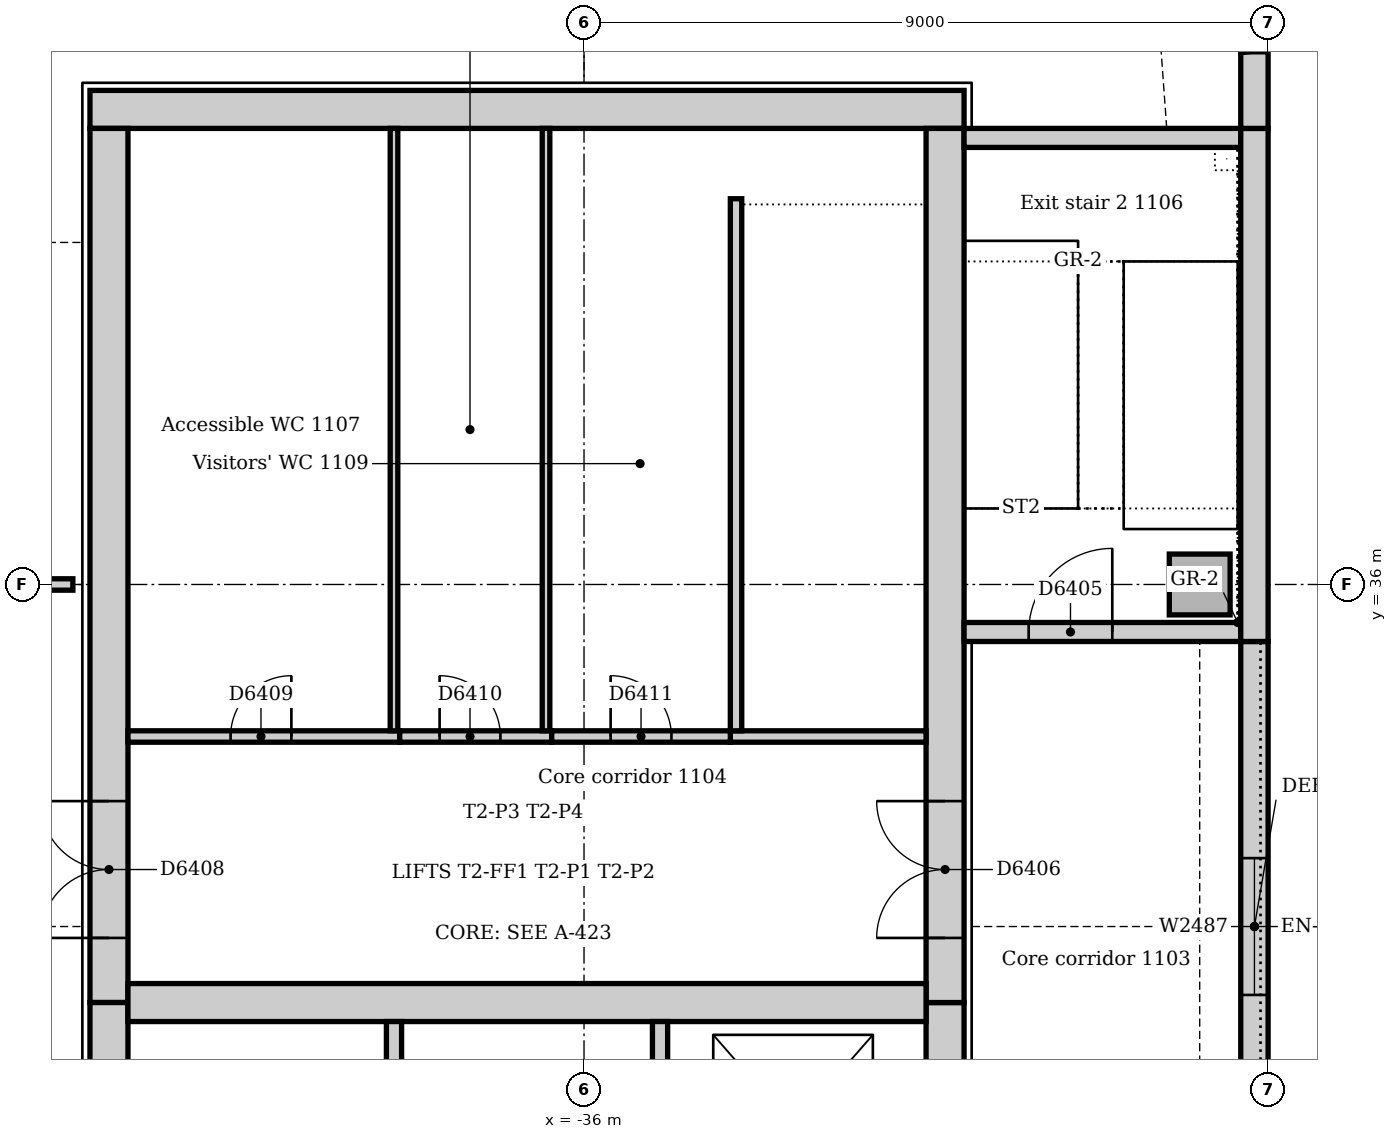
"""IFC4 building model, lengths in metres.
Left out: names, types, materials, properties, quantities, classifications, styles, units other than length and angle.
Written with IfcOpenShell. Run it as: python <this file> out.ifc"""

import sys

from ifc_helpers import new_model, si_unit, direction, frame, frame_2d, origin, origin_2d, place, context, subcontext, project, spatial, rectangle, extrude, element, fill, save


model = new_model("IFC4")
c1 = context("Model", 3, precision=1e-05, world=origin(), true_north=direction((0.0, 1.0)))
c2 = subcontext(c1, "Body", "Model", "MODEL_VIEW")
j1 = project(units=[si_unit("LENGTHUNIT", "METRE"), si_unit("PLANEANGLEUNIT", "RADIAN")], contexts=[c1])
p1 = place(None, origin())
s1 = spatial("IfcSite", under=j1, at=p1, CompositionType="ELEMENT")
p2 = place(p1, origin())
s2 = spatial("IfcBuilding", under=s1, at=p2, CompositionType="ELEMENT")
p3 = place(p2, frame((0.0, 0.0, 51.0)))
s3 = spatial("IfcBuildingStorey", under=s2, at=p3, CompositionType="ELEMENT", Elevation=51.0)
p4 = place(p3, frame((-31.0, 42.25, 0.0), z_axis=(0.0, 0.0, 1.0), x_axis=(-1.0, 0.0, 0.0)))
e1 = element("IfcWall", 1, at=p4, inside=s3, PredefinedType="SOLIDWALL", context=c2, shape_type="SweptSolid", body=[
    extrude(rectangle(XDim=11.5, YDim=0.5, at=frame_2d((5.75, 0.0))), origin(), (0.0, 0.0, 1.0), 4.0),
])
p5 = place(p3, frame((-31.25, 21.0, 0.0), z_axis=(0.0, 0.0, 1.0), x_axis=(0.0, 1.0, 0.0)))
e2 = element("IfcWall", 2, at=p5, inside=s3, PredefinedType="SOLIDWALL", context=c2, shape_type="SweptSolid", body=[
    extrude(rectangle(XDim=9.5, YDim=0.5, at=frame_2d((4.75, 0.0))), origin(), (0.0, 0.0, 1.0), 4.0),
])
p6 = place(p5, frame((5.25, 0.0, 0.0)))
e3 = element("IfcOpeningElement", 3, at=p6, cuts=e2, PredefinedType="OPENING", context=c2, shape_type="SweptSolid", body=[
    extrude(rectangle(XDim=1.0, YDim=2.1, at=frame_2d((0.5, 1.05))), frame((0.0, 0.26, 0.0), z_axis=(0.0, -1.0, 0.0), x_axis=(1.0, 0.0, 0.0)), (0.0, 0.0, 1.0), 0.52),
])
p7 = place(p3, frame((-31.25, 30.5, 0.0), z_axis=(0.0, 0.0, 1.0), x_axis=(0.0, 1.0, 0.0)))
e4 = element("IfcWall", 4, at=p7, inside=s3, PredefinedType="SOLIDWALL", context=c2, shape_type="SweptSolid", body=[
    extrude(rectangle(XDim=11.5, YDim=0.5, at=frame_2d((5.75, 0.0))), origin(), (0.0, 0.0, 1.0), 4.0),
])
p8 = place(p7, frame((0.85, 0.0, 0.0)))
e5 = element("IfcOpeningElement", 5, at=p8, cuts=e4, PredefinedType="OPENING", context=c2, shape_type="SweptSolid", body=[
    extrude(rectangle(XDim=1.8, YDim=2.1, at=frame_2d((0.9, 1.05))), frame((0.0, 0.26, 0.0), z_axis=(0.0, -1.0, 0.0), x_axis=(1.0, 0.0, 0.0)), (0.0, 0.0, 1.0), 0.52),
])
p9 = place(p3, frame((-42.25, 42.0, 0.0), z_axis=(0.0, 0.0, 1.0), x_axis=(0.0, -1.0, 0.0)))
e6 = element("IfcWall", 6, at=p9, inside=s3, PredefinedType="SOLIDWALL", context=c2, shape_type="SweptSolid", body=[
    extrude(rectangle(XDim=11.5, YDim=0.5, at=frame_2d((5.75, 0.0))), origin(), (0.0, 0.0, 1.0), 4.0),
])
p10 = place(p9, frame((8.85, 0.0, 0.0)))
e7 = element("IfcOpeningElement", 7, at=p10, cuts=e6, PredefinedType="OPENING", context=c2, shape_type="SweptSolid", body=[
    extrude(rectangle(XDim=1.8, YDim=2.1, at=frame_2d((0.9, 1.05))), frame((0.0, 0.26, 0.0), z_axis=(0.0, -1.0, 0.0), x_axis=(1.0, 0.0, 0.0)), (0.0, 0.0, 1.0), 0.52),
])
p11 = place(p3, frame((-42.25, 30.5, 0.0), z_axis=(0.0, 0.0, 1.0), x_axis=(0.0, -1.0, 0.0)))
e8 = element("IfcWall", 8, at=p11, inside=s3, PredefinedType="SOLIDWALL", context=c2, shape_type="SweptSolid", body=[
    extrude(rectangle(XDim=9.5, YDim=0.5, at=frame_2d((4.75, 0.0))), origin(), (0.0, 0.0, 1.0), 4.0),
])
p12 = place(p11, frame((3.85, 0.0, 0.0)))
e9 = element("IfcOpeningElement", 9, at=p12, cuts=e8, PredefinedType="OPENING", context=c2, shape_type="SweptSolid", body=[
    extrude(rectangle(XDim=1.8, YDim=2.1, at=frame_2d((0.9, 1.05))), frame((0.0, 0.26, 0.0), z_axis=(0.0, -1.0, 0.0), x_axis=(1.0, 0.0, 0.0)), (0.0, 0.0, 1.0), 0.52),
])
p13 = place(p3, frame((-42.0, 30.5, 0.0), z_axis=(0.0, 0.0, 1.0), x_axis=(1.0, 0.0, 0.0)))
e10 = element("IfcWall", 10, at=p13, inside=s3, PredefinedType="SOLIDWALL", context=c2, shape_type="SweptSolid", body=[
    extrude(rectangle(XDim=10.5, YDim=0.5, at=frame_2d((5.25, 0.0))), origin(), (0.0, 0.0, 1.0), 4.0),
])
p14 = place(p3, frame((-31.0, 35.375, 0.0), z_axis=(0.0, 0.0, 1.0), x_axis=(1.0, 0.0, 0.0)))
e11 = element("IfcWall", 11, at=p14, inside=s3, PredefinedType="SOLIDWALL", context=c2, shape_type="SweptSolid", body=[
    extrude(rectangle(XDim=3.64, YDim=0.25, at=frame_2d((1.82, 0.0))), origin(), (0.0, 0.0, 1.0), 4.0),
])
p15 = place(p14, frame((0.85, 0.0, 0.0)))
e12 = element("IfcOpeningElement", 12, at=p15, cuts=e11, PredefinedType="OPENING", context=c2, shape_type="SweptSolid", body=[
    extrude(rectangle(XDim=1.1, YDim=2.1, at=frame_2d((0.55, 1.05))), frame((0.0, 0.135, 0.0), z_axis=(0.0, -1.0, 0.0), x_axis=(1.0, 0.0, 0.0)), (0.0, 0.0, 1.0), 0.27),
])
p16 = place(p3, frame((-27.36, 41.875, 0.0), z_axis=(0.0, 0.0, 1.0), x_axis=(-1.0, 0.0, 0.0)))
e13 = element("IfcWall", 13, at=p16, inside=s3, PredefinedType="SOLIDWALL", context=c2, shape_type="SweptSolid", body=[
    extrude(rectangle(XDim=3.64, YDim=0.25, at=frame_2d((1.82, 0.0))), origin(), (0.0, 0.0, 1.0), 4.0),
])
p17 = place(p3, frame((-27.9, 36.0, 0.0), z_axis=(0.0, 0.0, 1.0), x_axis=(1.0, 0.0, 0.0)))
e14 = element("IfcColumn", 14, at=p17, inside=s3, PredefinedType="COLUMN", context=c2, shape_type="SweptSolid", body=[
    extrude(rectangle(XDim=0.8, YDim=0.8, at=origin_2d()), origin(), (0.0, 0.0, 1.0), 4.0),
])
p18 = place(p3, frame((-27.18, 27.75, 0.0), z_axis=(0.0, 0.0, 1.0), x_axis=(0.0, 1.0, 0.0)))
e15 = element("IfcWall", 15, at=p18, inside=s3, PredefinedType="STANDARD", context=c2, shape_type="SweptSolid", body=[
    extrude(rectangle(XDim=7.5, YDim=0.36, at=frame_2d((3.75, 0.0))), origin(), (0.0, 0.0, 1.0), 3.85),
])
p19 = place(p18, frame((2.85, 0.0, 1.2)))
e16 = element("IfcOpeningElement", 16, at=p19, cuts=e15, PredefinedType="OPENING", context=c2, shape_type="SweptSolid", body=[
    extrude(rectangle(XDim=1.8, YDim=1.2, at=frame_2d((0.9, 0.6))), frame((0.0, 0.19, 0.0), z_axis=(0.0, -1.0, 0.0), x_axis=(1.0, 0.0, 0.0)), (0.0, 0.0, 1.0), 0.38),
])
p20 = place(p3, frame((-27.18, 35.25, 0.0), z_axis=(0.0, 0.0, 1.0), x_axis=(0.0, 1.0, 0.0)))
e17 = element("IfcWall", 17, at=p20, inside=s3, PredefinedType="STANDARD", context=c2, shape_type="SweptSolid", body=[
    extrude(rectangle(XDim=6.75, YDim=0.36, at=frame_2d((3.375, 0.0))), origin(), (0.0, 0.0, 1.0), 3.85),
])
p21 = place(p3, frame((-27.18, 42.0, 0.0), z_axis=(0.0, 0.0, 1.0), x_axis=(0.0, 1.0, 0.0)))
e18 = element("IfcWall", 18, at=p21, inside=s3, PredefinedType="STANDARD", context=c2, shape_type="SweptSolid", body=[
    extrude(rectangle(XDim=1.007, YDim=0.36, at=frame_2d((0.504, 0.0))), origin(), (0.0, 0.0, 1.0), 3.85),
])
p22 = place(p3, frame((-27.183, 43.019, 0.0), z_axis=(0.0, 0.0, 1.0), x_axis=(-0.13055608231, 0.99144092581, 0.0)))
e19 = element("IfcWall", 19, at=p22, inside=s3, PredefinedType="STANDARD", context=c2, shape_type="SweptSolid", body=[
    extrude(rectangle(XDim=0.713, YDim=0.36, at=frame_2d((0.356, 0.0))), origin(), (0.0, 0.0, 1.0), 3.85),
])
for number, where, z_axis, x_axis in (
    (20, (-38.5, 27.4, 0.0), (0.0, 0.0, 1.0), (0.0, 1.0, 0.0)),
    (21, (-35.0, 27.4, 0.0), (0.0, 0.0, 1.0), (0.0, 1.0, 0.0)),
):
    element("IfcWall", number, at=place(p3, frame(where, z_axis=z_axis, x_axis=x_axis)), inside=s3, PredefinedType="SOLIDWALL", context=c2, shape_type="SweptSolid", body=[
        extrude(rectangle(XDim=2.85, YDim=0.2, at=frame_2d((1.425, 0.0))), origin(), (0.0, 0.0, 1.0), 4.0),
    ])
p23 = place(p3, frame((-34.075, 34.0, 0.0), z_axis=(0.0, 0.0, 1.0), x_axis=(1.0, 0.0, 0.0)))
e22 = element("IfcWall", 22, at=p23, inside=s3, PredefinedType="SOLIDWALL", context=c2, shape_type="SweptSolid", body=[
    extrude(rectangle(XDim=2.575, YDim=0.15, at=frame_2d((1.288, 0.0))), origin(), (0.0, 0.0, 1.0), 4.0),
])
p24 = place(p3, frame((-34.0, 41.075, 0.0), z_axis=(0.0, 0.0, 1.0), x_axis=(0.0, -1.0, 0.0)))
e23 = element("IfcWall", 23, at=p24, inside=s3, PredefinedType="SOLIDWALL", context=c2, shape_type="SweptSolid", body=[
    extrude(rectangle(XDim=7.0, YDim=0.15, at=frame_2d((3.5, 0.0))), origin(), (0.0, 0.0, 1.0), 4.0),
])
p25 = place(p3, frame((-38.425, 34.0, 0.0), z_axis=(0.0, 0.0, 1.0), x_axis=(-1.0, 0.0, 0.0)))
e24 = element("IfcWall", 24, at=p25, inside=s3, PredefinedType="PARTITIONING", context=c2, shape_type="SweptSolid", body=[
    extrude(rectangle(XDim=3.575, YDim=0.15, at=frame_2d((1.788, 0.0))), origin(), (0.0, 0.0, 1.0), 3.85),
])
p26 = place(p25, frame((1.425, 0.0, 0.0)))
e25 = element("IfcOpeningElement", 25, at=p26, cuts=e24, PredefinedType="OPENING", context=c2, shape_type="SweptSolid", body=[
    extrude(rectangle(XDim=0.8, YDim=2.1, at=frame_2d((0.4, 1.05))), frame((0.0, 0.085, 0.0), z_axis=(0.0, -1.0, 0.0), x_axis=(1.0, 0.0, 0.0)), (0.0, 0.0, 1.0), 0.17),
])
p27 = place(p3, frame((-36.425, 34.0, 0.0), z_axis=(0.0, 0.0, 1.0), x_axis=(-1.0, 0.0, 0.0)))
e26 = element("IfcWall", 26, at=p27, inside=s3, PredefinedType="PARTITIONING", context=c2, shape_type="SweptSolid", body=[
    extrude(rectangle(XDim=2.0, YDim=0.15, at=frame_2d((1.0, 0.0))), origin(), (0.0, 0.0, 1.0), 3.85),
])
p28 = place(p27, frame((0.675, 0.0, 0.0)))
e27 = element("IfcOpeningElement", 27, at=p28, cuts=e26, PredefinedType="OPENING", context=c2, shape_type="SweptSolid", body=[
    extrude(rectangle(XDim=0.8, YDim=2.1, at=frame_2d((0.4, 1.05))), frame((0.0, 0.085, 0.0), z_axis=(0.0, -1.0, 0.0), x_axis=(1.0, 0.0, 0.0)), (0.0, 0.0, 1.0), 0.17),
])
p29 = place(p3, frame((-34.075, 34.0, 0.0), z_axis=(0.0, 0.0, 1.0), x_axis=(-1.0, 0.0, 0.0)))
e28 = element("IfcWall", 28, at=p29, inside=s3, PredefinedType="PARTITIONING", context=c2, shape_type="SweptSolid", body=[
    extrude(rectangle(XDim=2.35, YDim=0.15, at=frame_2d((1.175, 0.0))), origin(), (0.0, 0.0, 1.0), 3.85),
])
p30 = place(p29, frame((0.775, 0.0, 0.0)))
e29 = element("IfcOpeningElement", 29, at=p30, cuts=e28, PredefinedType="OPENING", context=c2, shape_type="SweptSolid", body=[
    extrude(rectangle(XDim=0.8, YDim=2.1, at=frame_2d((0.4, 1.05))), frame((0.0, 0.085, 0.0), z_axis=(0.0, -1.0, 0.0), x_axis=(1.0, 0.0, 0.0)), (0.0, 0.0, 1.0), 0.17),
])
for number, where, z_axis, x_axis in (
    (30, (-38.5, 34.075, 0.0), (0.0, 0.0, 1.0), (0.0, 1.0, 0.0)),
    (31, (-36.5, 34.075, 0.0), (0.0, 0.0, 1.0), (0.0, 1.0, 0.0)),
):
    element("IfcWall", number, at=place(p3, frame(where, z_axis=z_axis, x_axis=x_axis)), inside=s3, PredefinedType="PARTITIONING", context=c2, shape_type="SweptSolid", body=[
        extrude(rectangle(XDim=7.925, YDim=0.1, at=frame_2d((3.962, 0.0))), origin(), (0.0, 0.0, 1.0), 3.85),
    ])
p31 = place(p3, frame((-44.65, 36.0, 0.0), z_axis=(0.0, 0.0, 1.0), x_axis=(1.0, 0.0, 0.0)))
e32 = element("IfcWall", 32, at=p31, inside=s3, PredefinedType="PARTITIONING", context=c2, shape_type="SweptSolid", body=[
    extrude(rectangle(XDim=1.925, YDim=0.15, at=frame_2d((0.963, 0.0))), origin(), (0.0, 0.0, 1.0), 3.602),
])
p32 = place(p31, frame((0.5, 0.0, 0.0)))
e33 = element("IfcOpeningElement", 33, at=p32, cuts=e32, PredefinedType="OPENING", context=c2, shape_type="SweptSolid", body=[
    extrude(rectangle(XDim=0.9, YDim=2.1, at=frame_2d((0.45, 1.05))), frame((0.0, 0.085, 0.0), z_axis=(0.0, -1.0, 0.0), x_axis=(1.0, 0.0, 0.0)), (0.0, 0.0, 1.0), 0.17),
])
p33 = place(p19, origin())
e34 = element("IfcWindow", 34, at=p33, inside=s3, PartitioningType="SINGLE_PANEL", PredefinedType="WINDOW", context=c2, shape_type="SweptSolid", body=[
    extrude(rectangle(XDim=1.8, YDim=1.2, at=frame_2d((0.9, 0.6))), frame((0.0, 0.13, 0.0), z_axis=(0.0, -1.0, 0.0), x_axis=(1.0, 0.0, 0.0)), (0.0, 0.0, 1.0), 0.06),
])
fill(e16, e34)
p34 = place(p15, origin())
e35 = element("IfcDoor", 35, at=p34, inside=s3, OperationType="SINGLE_SWING_RIGHT", PredefinedType="DOOR", context=c2, shape_type="SweptSolid", body=[
    extrude(rectangle(XDim=1.1, YDim=2.1, at=frame_2d((0.55, 1.05))), frame((0.0, 0.025, 0.0), z_axis=(0.0, -1.0, 0.0), x_axis=(1.0, 0.0, 0.0)), (0.0, 0.0, 1.0), 0.05),
])
fill(e12, e35)
p35 = place(p8, origin())
e36 = element("IfcDoor", 36, at=p35, inside=s3, OperationType="DOUBLE_DOOR_SINGLE_SWING", PredefinedType="DOOR", context=c2, shape_type="SweptSolid", body=[
    extrude(rectangle(XDim=1.8, YDim=2.1, at=frame_2d((0.9, 1.05))), frame((0.0, 0.025, 0.0), z_axis=(0.0, -1.0, 0.0), x_axis=(1.0, 0.0, 0.0)), (0.0, 0.0, 1.0), 0.05),
])
fill(e5, e36)
p36 = place(p10, frame((1.8, 0.0, 0.0), z_axis=(0.0, 0.0, 1.0), x_axis=(-1.0, 0.0, 0.0)))
e37 = element("IfcDoor", 37, at=p36, inside=s3, OperationType="DOUBLE_DOOR_SINGLE_SWING", PredefinedType="DOOR", context=c2, shape_type="SweptSolid", body=[
    extrude(rectangle(XDim=1.8, YDim=2.1, at=frame_2d((0.9, 1.05))), frame((0.0, 0.025, 0.0), z_axis=(0.0, -1.0, 0.0), x_axis=(1.0, 0.0, 0.0)), (0.0, 0.0, 1.0), 0.05),
])
fill(e7, e37)
p37 = place(p26, frame((0.8, 0.0, 0.0), z_axis=(0.0, 0.0, 1.0), x_axis=(-1.0, 0.0, 0.0)))
e38 = element("IfcDoor", 38, at=p37, inside=s3, OperationType="SINGLE_SWING_RIGHT", PredefinedType="DOOR", context=c2, shape_type="SweptSolid", body=[
    extrude(rectangle(XDim=0.8, YDim=2.1, at=frame_2d((0.4, 1.05))), frame((0.0, 0.025, 0.0), z_axis=(0.0, -1.0, 0.0), x_axis=(1.0, 0.0, 0.0)), (0.0, 0.0, 1.0), 0.05),
])
fill(e25, e38)
p38 = place(p28, frame((0.8, 0.0, 0.0), z_axis=(0.0, 0.0, 1.0), x_axis=(-1.0, 0.0, 0.0)))
e39 = element("IfcDoor", 39, at=p38, inside=s3, OperationType="SINGLE_SWING_LEFT", PredefinedType="DOOR", context=c2, shape_type="SweptSolid", body=[
    extrude(rectangle(XDim=0.8, YDim=2.1, at=frame_2d((0.4, 1.05))), frame((0.0, 0.025, 0.0), z_axis=(0.0, -1.0, 0.0), x_axis=(1.0, 0.0, 0.0)), (0.0, 0.0, 1.0), 0.05),
])
fill(e27, e39)
p39 = place(p30, frame((0.8, 0.0, 0.0), z_axis=(0.0, 0.0, 1.0), x_axis=(-1.0, 0.0, 0.0)))
e40 = element("IfcDoor", 40, at=p39, inside=s3, OperationType="SINGLE_SWING_LEFT", PredefinedType="DOOR", context=c2, shape_type="SweptSolid", body=[
    extrude(rectangle(XDim=0.8, YDim=2.1, at=frame_2d((0.4, 1.05))), frame((0.0, 0.025, 0.0), z_axis=(0.0, -1.0, 0.0), x_axis=(1.0, 0.0, 0.0)), (0.0, 0.0, 1.0), 0.05),
])
fill(e29, e40)
save(model, sys.argv[1])
